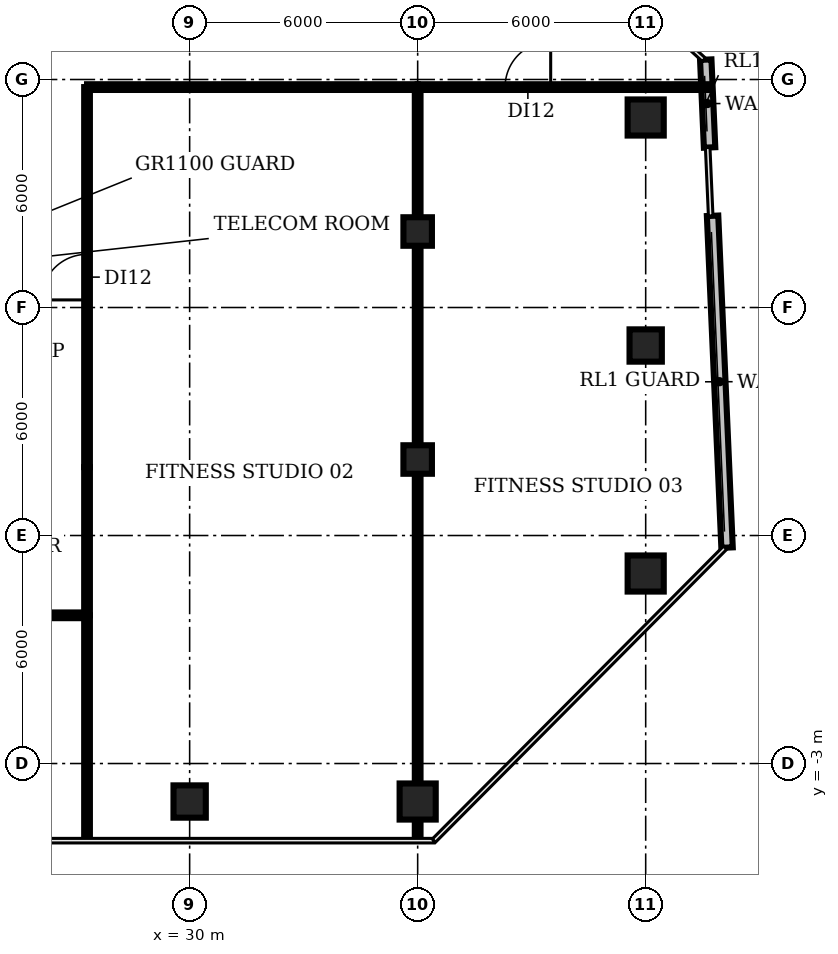
"""IFC4 building model, lengths in metres.
Left out: names, types, materials, properties, quantities, classifications, styles, units other than length and angle.
Written with IfcOpenShell. Run it as: python <this file> out.ifc"""

import sys

from ifc_helpers import new_model, si_unit, direction, frame, frame_2d, origin, origin_2d, place, context, subcontext, project, spatial, rectangle, circle, extrude, element, fill, save


model = new_model("IFC4")
c1 = context("Model", 3, precision=1e-05, world=origin(), true_north=direction((0.0, 1.0)))
c2 = subcontext(c1, "Body", "Model", "MODEL_VIEW")
j1 = project(units=[si_unit("LENGTHUNIT", "METRE"), si_unit("PLANEANGLEUNIT", "RADIAN")], contexts=[c1])
p1 = place(None, origin())
s1 = spatial("IfcSite", under=j1, at=p1, CompositionType="ELEMENT")
p2 = place(p1, origin())
s2 = spatial("IfcBuilding", under=s1, at=p2, CompositionType="ELEMENT")
p3 = place(p2, frame((0.0, 0.0, 180.2)))
s3 = spatial("IfcBuildingStorey", under=s2, at=p3, CompositionType="ELEMENT", Elevation=180.2)
p4 = place(p3, frame((30.0, -4.0, 0.0), z_axis=(0.0, 0.0, 1.0), x_axis=(1.0, 0.0, 0.0)))
e1 = element("IfcColumn", 1, at=p4, inside=s3, PredefinedType="COLUMN", context=c2, shape_type="SweptSolid", body=[
    extrude(rectangle(XDim=0.85, YDim=0.85, at=origin_2d()), origin(), (0.0, 0.0, 1.0), 3.85),
])
p5 = place(p3, frame((36.0, -4.0, 0.0), z_axis=(0.0, 0.0, 1.0), x_axis=(1.0, 0.0, 0.0)))
e2 = element("IfcColumn", 2, at=p5, inside=s3, PredefinedType="COLUMN", context=c2, shape_type="SweptSolid", body=[
    extrude(circle(Radius=0.475, at=origin_2d()), origin(), (0.0, 0.0, 1.0), 3.85),
])
for number, where, z_axis, x_axis in (
    (3, (36.0, 5.0, 0.0), (0.0, 0.0, 1.0), (1.0, 0.0, 0.0)),
    (4, (36.0, 11.0, 0.0), (0.0, 0.0, 1.0), (1.0, 0.0, 0.0)),
):
    element("IfcColumn", number, at=place(p3, frame(where, z_axis=z_axis, x_axis=x_axis)), inside=s3, PredefinedType="COLUMN", context=c2, shape_type="SweptSolid", body=[
        extrude(rectangle(XDim=0.75, YDim=0.75, at=origin_2d()), origin(), (0.0, 0.0, 1.0), 3.85),
    ])
p6 = place(p3, frame((42.0, 2.0, 0.0), z_axis=(0.0, 0.0, 1.0), x_axis=(1.0, 0.0, 0.0)))
e5 = element("IfcColumn", 5, at=p6, inside=s3, PredefinedType="COLUMN", context=c2, shape_type="SweptSolid", body=[
    extrude(circle(Radius=0.475, at=origin_2d()), origin(), (0.0, 0.0, 1.0), 3.85),
])
p7 = place(p3, frame((42.0, 8.0, 0.0), z_axis=(0.0, 0.0, 1.0), x_axis=(1.0, 0.0, 0.0)))
e6 = element("IfcColumn", 6, at=p7, inside=s3, PredefinedType="COLUMN", context=c2, shape_type="SweptSolid", body=[
    extrude(rectangle(XDim=0.85, YDim=0.85, at=origin_2d()), origin(), (0.0, 0.0, 1.0), 3.85),
])
p8 = place(p3, frame((42.0, 14.0, 0.0), z_axis=(0.0, 0.0, 1.0), x_axis=(1.0, 0.0, 0.0)))
e7 = element("IfcColumn", 7, at=p8, inside=s3, PredefinedType="COLUMN", context=c2, shape_type="SweptSolid", body=[
    extrude(circle(Radius=0.475, at=origin_2d()), origin(), (0.0, 0.0, 1.0), 3.85),
])
p9 = place(p3, frame((44.141, 2.682, 0.0), z_axis=(0.0, 0.0, 1.0), x_axis=(-0.043632390192, 0.999047653781, 0.0)))
e8 = element("IfcWall", 8, at=p9, inside=s3, PredefinedType="SOLIDWALL", context=c2, shape_type="SweptSolid", body=[
    extrude(rectangle(XDim=8.74, YDim=0.3, at=frame_2d((4.37, 0.0))), origin(), (0.0, 0.0, 1.0), 3.85),
])
p10 = place(p3, frame((43.681, 13.212, 0.0), z_axis=(0.0, 0.0, 1.0), x_axis=(-0.043693705814, 0.999044973999, 0.0)))
e9 = element("IfcWall", 9, at=p10, inside=s3, PredefinedType="SOLIDWALL", context=c2, shape_type="SweptSolid", body=[
    extrude(rectangle(XDim=2.313, YDim=0.3, at=frame_2d((1.157, 0.0))), origin(), (0.0, 0.0, 1.0), 3.85),
])
p11 = place(p3, frame((27.3, -4.98, 0.0), z_axis=(0.0, 0.0, 1.0), x_axis=(0.0, 1.0, 0.0)))
e10 = element("IfcWall", 10, at=p11, inside=s3, PredefinedType="PARTITIONING", context=c2, shape_type="SweptSolid", body=[
    extrude(rectangle(XDim=5.88, YDim=0.15, at=frame_2d((2.94, 0.0))), origin(), (0.0, 0.0, 1.0), 2.88),
])
p12 = place(p3, frame((27.3, 0.9, 0.0), z_axis=(0.0, 0.0, 1.0), x_axis=(-1.0, 0.0, 0.0)))
e11 = element("IfcWall", 11, at=p12, inside=s3, PredefinedType="PARTITIONING", context=c2, shape_type="SweptSolid", body=[
    extrude(rectangle(XDim=24.6, YDim=0.15, at=frame_2d((12.3, 0.0))), origin(), (0.0, 0.0, 1.0), 2.88),
])
p13 = place(p12, frame((11.8, 0.0, 0.0)))
e12 = element("IfcOpeningElement", 12, at=p13, cuts=e11, PredefinedType="OPENING", context=c2, shape_type="SweptSolid", body=[
    extrude(rectangle(XDim=1.2, YDim=2.1, at=frame_2d((0.6, 1.05))), frame((0.0, 0.085, 0.0), z_axis=(0.0, -1.0, 0.0), x_axis=(1.0, 0.0, 0.0)), (0.0, 0.0, 1.0), 0.17),
])
p14 = place(p3, frame((27.3, 0.9, 0.0), z_axis=(0.0, 0.0, 1.0), x_axis=(0.0, 1.0, 0.0)))
e13 = element("IfcWall", 13, at=p14, inside=s3, PredefinedType="PARTITIONING", context=c2, shape_type="SweptSolid", body=[
    extrude(rectangle(XDim=3.9, YDim=0.15, at=frame_2d((1.95, 0.0))), origin(), (0.0, 0.0, 1.0), 2.88),
])
p15 = place(p3, frame((27.3, 4.8, 0.0), z_axis=(0.0, 0.0, 1.0), x_axis=(0.0, 1.0, 0.0)))
e14 = element("IfcWall", 14, at=p15, inside=s3, PredefinedType="PARTITIONING", context=c2, shape_type="SweptSolid", body=[
    extrude(rectangle(XDim=10.0, YDim=0.15, at=frame_2d((5.0, 0.0))), origin(), (0.0, 0.0, 1.0), 2.88),
])
p16 = place(p15, frame((4.4, 0.0, 0.0)))
e15 = element("IfcOpeningElement", 15, at=p16, cuts=e14, PredefinedType="OPENING", context=c2, shape_type="SweptSolid", body=[
    extrude(rectangle(XDim=1.2, YDim=2.1, at=frame_2d((0.6, 1.05))), frame((0.0, 0.085, 0.0), z_axis=(0.0, -1.0, 0.0), x_axis=(1.0, 0.0, 0.0)), (0.0, 0.0, 1.0), 0.17),
])
p17 = place(p3, frame((27.3, 14.8, 0.0), z_axis=(0.0, 0.0, 1.0), x_axis=(1.0, 0.0, 0.0)))
e16 = element("IfcWall", 16, at=p17, inside=s3, PredefinedType="PARTITIONING", context=c2, shape_type="SweptSolid", body=[
    extrude(rectangle(XDim=8.7, YDim=0.15, at=frame_2d((4.35, 0.0))), origin(), (0.0, 0.0, 1.0), 2.88),
])
p18 = place(p3, frame((36.0, -4.98, 0.0), z_axis=(0.0, 0.0, 1.0), x_axis=(0.0, 1.0, 0.0)))
e17 = element("IfcWall", 17, at=p18, inside=s3, PredefinedType="PARTITIONING", context=c2, shape_type="SweptSolid", body=[
    extrude(rectangle(XDim=19.78, YDim=0.15, at=frame_2d((9.89, 0.0))), origin(), (0.0, 0.0, 1.0), 2.88),
])
p19 = place(p3, frame((36.0, 14.8, 0.0), z_axis=(0.0, 0.0, 1.0), x_axis=(1.0, 0.0, 0.0)))
e18 = element("IfcWall", 18, at=p19, inside=s3, PredefinedType="PARTITIONING", context=c2, shape_type="SweptSolid", body=[
    extrude(rectangle(XDim=7.622, YDim=0.15, at=frame_2d((3.811, 0.0))), origin(), (0.0, 0.0, 1.0), 2.88),
])
p20 = place(p19, frame((2.3, 0.0, 0.0)))
e19 = element("IfcOpeningElement", 19, at=p20, cuts=e18, PredefinedType="OPENING", context=c2, shape_type="SweptSolid", body=[
    extrude(rectangle(XDim=1.2, YDim=2.1, at=frame_2d((0.6, 1.05))), frame((0.0, 0.085, 0.0), z_axis=(0.0, -1.0, 0.0), x_axis=(1.0, 0.0, 0.0)), (0.0, 0.0, 1.0), 0.17),
])
p21 = place(p16, origin())
e20 = element("IfcDoor", 20, at=p21, inside=s3, OperationType="SINGLE_SWING_LEFT", PredefinedType="DOOR", context=c2, shape_type="SweptSolid", body=[
    extrude(rectangle(XDim=1.2, YDim=2.1, at=frame_2d((0.6, 1.05))), frame((0.0, 0.025, 0.0), z_axis=(0.0, -1.0, 0.0), x_axis=(1.0, 0.0, 0.0)), (0.0, 0.0, 1.0), 0.05),
])
fill(e15, e20)
p22 = place(p20, origin())
e21 = element("IfcDoor", 21, at=p22, inside=s3, OperationType="SINGLE_SWING_RIGHT", PredefinedType="DOOR", context=c2, shape_type="SweptSolid", body=[
    extrude(rectangle(XDim=1.2, YDim=2.1, at=frame_2d((0.6, 1.05))), frame((0.0, 0.025, 0.0), z_axis=(0.0, -1.0, 0.0), x_axis=(1.0, 0.0, 0.0)), (0.0, 0.0, 1.0), 0.05),
])
fill(e19, e21)
save(model, sys.argv[1])
